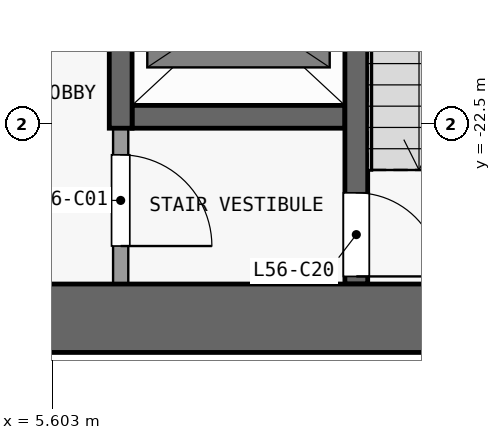
"""IFC4 building model, lengths in metres.
Left out: names, types, materials, properties, quantities, classifications, styles, units other than length and angle.
Written with IfcOpenShell. Run it as: python <this file> out.ifc"""

import sys

from ifc_helpers import new_model, si_unit, direction, frame, frame_2d, origin, place, context, subcontext, project, spatial, rectangle, extrude, element, fill, save


model = new_model("IFC4")
c1 = context("Model", 3, precision=1e-05, world=origin(), true_north=direction((0.0, 1.0)))
c2 = subcontext(c1, "Body", "Model", "MODEL_VIEW")
j1 = project(units=[si_unit("LENGTHUNIT", "METRE"), si_unit("PLANEANGLEUNIT", "RADIAN")], contexts=[c1])
p1 = place(None, origin())
s1 = spatial("IfcSite", under=j1, at=p1, CompositionType="ELEMENT")
p2 = place(p1, origin())
s2 = spatial("IfcBuilding", under=s1, at=p2, CompositionType="ELEMENT")
p3 = place(p2, frame((0.0, 0.0, 223.1)))
s3 = spatial("IfcBuildingStorey", under=s2, at=p3, CompositionType="ELEMENT", Elevation=223.1)
p4 = place(p3, frame((-13.2, -25.05, 0.0), z_axis=(0.0, 0.0, 1.0), x_axis=(1.0, 0.0, 0.0)))
e1 = element("IfcWall", 1, at=p4, inside=s3, PredefinedType="SHEAR", context=c2, shape_type="SweptSolid", body=[
    extrude(rectangle(XDim=26.4, YDim=0.9, at=frame_2d((13.2, 0.0))), origin(), (0.0, 0.0, 1.0), 3.3),
])
p5 = place(p3, frame((6.65, -22.4, 0.0), z_axis=(0.0, 0.0, 1.0), x_axis=(1.0, 0.0, 0.0)))
e2 = element("IfcWall", 2, at=p5, inside=s3, PredefinedType="SHEAR", context=c2, shape_type="SweptSolid", body=[
    extrude(rectangle(XDim=2.8, YDim=0.3, at=frame_2d((1.4, 0.0))), origin(), (0.0, 0.0, 1.0), 3.3),
])
p6 = place(p3, frame((6.5, -22.55, 0.0), z_axis=(0.0, 0.0, 1.0), x_axis=(0.0, -1.0, 0.0)))
e3 = element("IfcWall", 3, at=p6, inside=s3, PredefinedType="PARTITIONING", context=c2, shape_type="SweptSolid", body=[
    extrude(rectangle(XDim=2.05, YDim=0.2, at=frame_2d((1.025, 0.0))), origin(), (0.0, 0.0, 1.0), 3.3),
])
p7 = place(p6, frame((0.35, 0.0, 0.0)))
e4 = element("IfcOpeningElement", 4, at=p7, cuts=e3, PredefinedType="OPENING", context=c2, shape_type="SweptSolid", body=[
    extrude(rectangle(XDim=1.2, YDim=2.1, at=frame_2d((0.6, 1.05))), frame((0.0, 0.11, 0.0), z_axis=(0.0, -1.0, 0.0), x_axis=(1.0, 0.0, 0.0)), (0.0, 0.0, 1.0), 0.22),
])
p8 = place(p3, frame((6.5, -22.55, 0.0), z_axis=(0.0, 0.0, 1.0), x_axis=(0.0, 1.0, 0.0)))
e5 = element("IfcWall", 5, at=p8, inside=s3, PredefinedType="SHEAR", context=c2, shape_type="SweptSolid", body=[
    extrude(rectangle(XDim=14.05, YDim=0.3, at=frame_2d((7.025, 0.0))), origin(), (0.0, 0.0, 1.0), 3.3),
])
p9 = place(p8, frame((1.05, 0.0, 0.0)))
e6 = element("IfcOpeningElement", 6, at=p9, cuts=e5, PredefinedType="OPENING", context=c2, shape_type="SweptSolid", body=[
    extrude(rectangle(XDim=1.1, YDim=2.1, at=frame_2d((0.55, 1.05))), frame((0.0, 0.16, 0.0), z_axis=(0.0, -1.0, 0.0), x_axis=(1.0, 0.0, 0.0)), (0.0, 0.0, 1.0), 0.32),
])
p10 = place(p8, frame((3.875, 0.0, 0.0)))
e7 = element("IfcOpeningElement", 7, at=p10, cuts=e5, PredefinedType="OPENING", context=c2, shape_type="SweptSolid", body=[
    extrude(rectangle(XDim=1.1, YDim=2.1, at=frame_2d((0.55, 1.05))), frame((0.0, 0.16, 0.0), z_axis=(0.0, -1.0, 0.0), x_axis=(1.0, 0.0, 0.0)), (0.0, 0.0, 1.0), 0.32),
])
p11 = place(p8, frame((6.625, 0.0, 0.0)))
e8 = element("IfcOpeningElement", 8, at=p11, cuts=e5, PredefinedType="OPENING", context=c2, shape_type="SweptSolid", body=[
    extrude(rectangle(XDim=1.1, YDim=2.1, at=frame_2d((0.55, 1.05))), frame((0.0, 0.16, 0.0), z_axis=(0.0, -1.0, 0.0), x_axis=(1.0, 0.0, 0.0)), (0.0, 0.0, 1.0), 0.32),
])
p12 = place(p8, frame((9.375, 0.0, 0.0)))
e9 = element("IfcOpeningElement", 9, at=p12, cuts=e5, PredefinedType="OPENING", context=c2, shape_type="SweptSolid", body=[
    extrude(rectangle(XDim=1.1, YDim=2.1, at=frame_2d((0.55, 1.05))), frame((0.0, 0.16, 0.0), z_axis=(0.0, -1.0, 0.0), x_axis=(1.0, 0.0, 0.0)), (0.0, 0.0, 1.0), 0.32),
])
p13 = place(p8, frame((12.125, 0.0, 0.0)))
e10 = element("IfcOpeningElement", 10, at=p13, cuts=e5, PredefinedType="OPENING", context=c2, shape_type="SweptSolid", body=[
    extrude(rectangle(XDim=1.1, YDim=2.1, at=frame_2d((0.55, 1.05))), frame((0.0, 0.16, 0.0), z_axis=(0.0, -1.0, 0.0), x_axis=(1.0, 0.0, 0.0)), (0.0, 0.0, 1.0), 0.32),
])
p14 = place(p3, frame((9.6, -16.9, 0.0), z_axis=(0.0, 0.0, 1.0), x_axis=(0.0, -1.0, 0.0)))
e11 = element("IfcWall", 11, at=p14, inside=s3, PredefinedType="SHEAR", context=c2, shape_type="SweptSolid", body=[
    extrude(rectangle(XDim=7.7, YDim=0.3, at=frame_2d((3.85, 0.0))), origin(), (0.0, 0.0, 1.0), 3.3),
])
p15 = place(p14, frame((6.5, 0.0, 0.0)))
e12 = element("IfcOpeningElement", 12, at=p15, cuts=e11, PredefinedType="OPENING", context=c2, shape_type="SweptSolid", body=[
    extrude(rectangle(XDim=1.1, YDim=2.1, at=frame_2d((0.55, 1.05))), frame((0.0, 0.16, 0.0), z_axis=(0.0, -1.0, 0.0), x_axis=(1.0, 0.0, 0.0)), (0.0, 0.0, 1.0), 0.32),
])
p16 = place(p7, origin())
e13 = element("IfcDoor", 13, at=p16, inside=s3, OperationType="SINGLE_SWING_RIGHT", PredefinedType="DOOR", context=c2, shape_type="SweptSolid", body=[
    extrude(rectangle(XDim=1.2, YDim=2.1, at=frame_2d((0.6, 1.05))), frame((0.0, 0.025, 0.0), z_axis=(0.0, -1.0, 0.0), x_axis=(1.0, 0.0, 0.0)), (0.0, 0.0, 1.0), 0.05),
])
fill(e4, e13)
p17 = place(p15, origin())
e14 = element("IfcDoor", 14, at=p17, inside=s3, OperationType="SINGLE_SWING_RIGHT", PredefinedType="DOOR", context=c2, shape_type="SweptSolid", body=[
    extrude(rectangle(XDim=1.1, YDim=2.1, at=frame_2d((0.55, 1.05))), frame((0.0, 0.025, 0.0), z_axis=(0.0, -1.0, 0.0), x_axis=(1.0, 0.0, 0.0)), (0.0, 0.0, 1.0), 0.05),
])
fill(e12, e14)
save(model, sys.argv[1])
